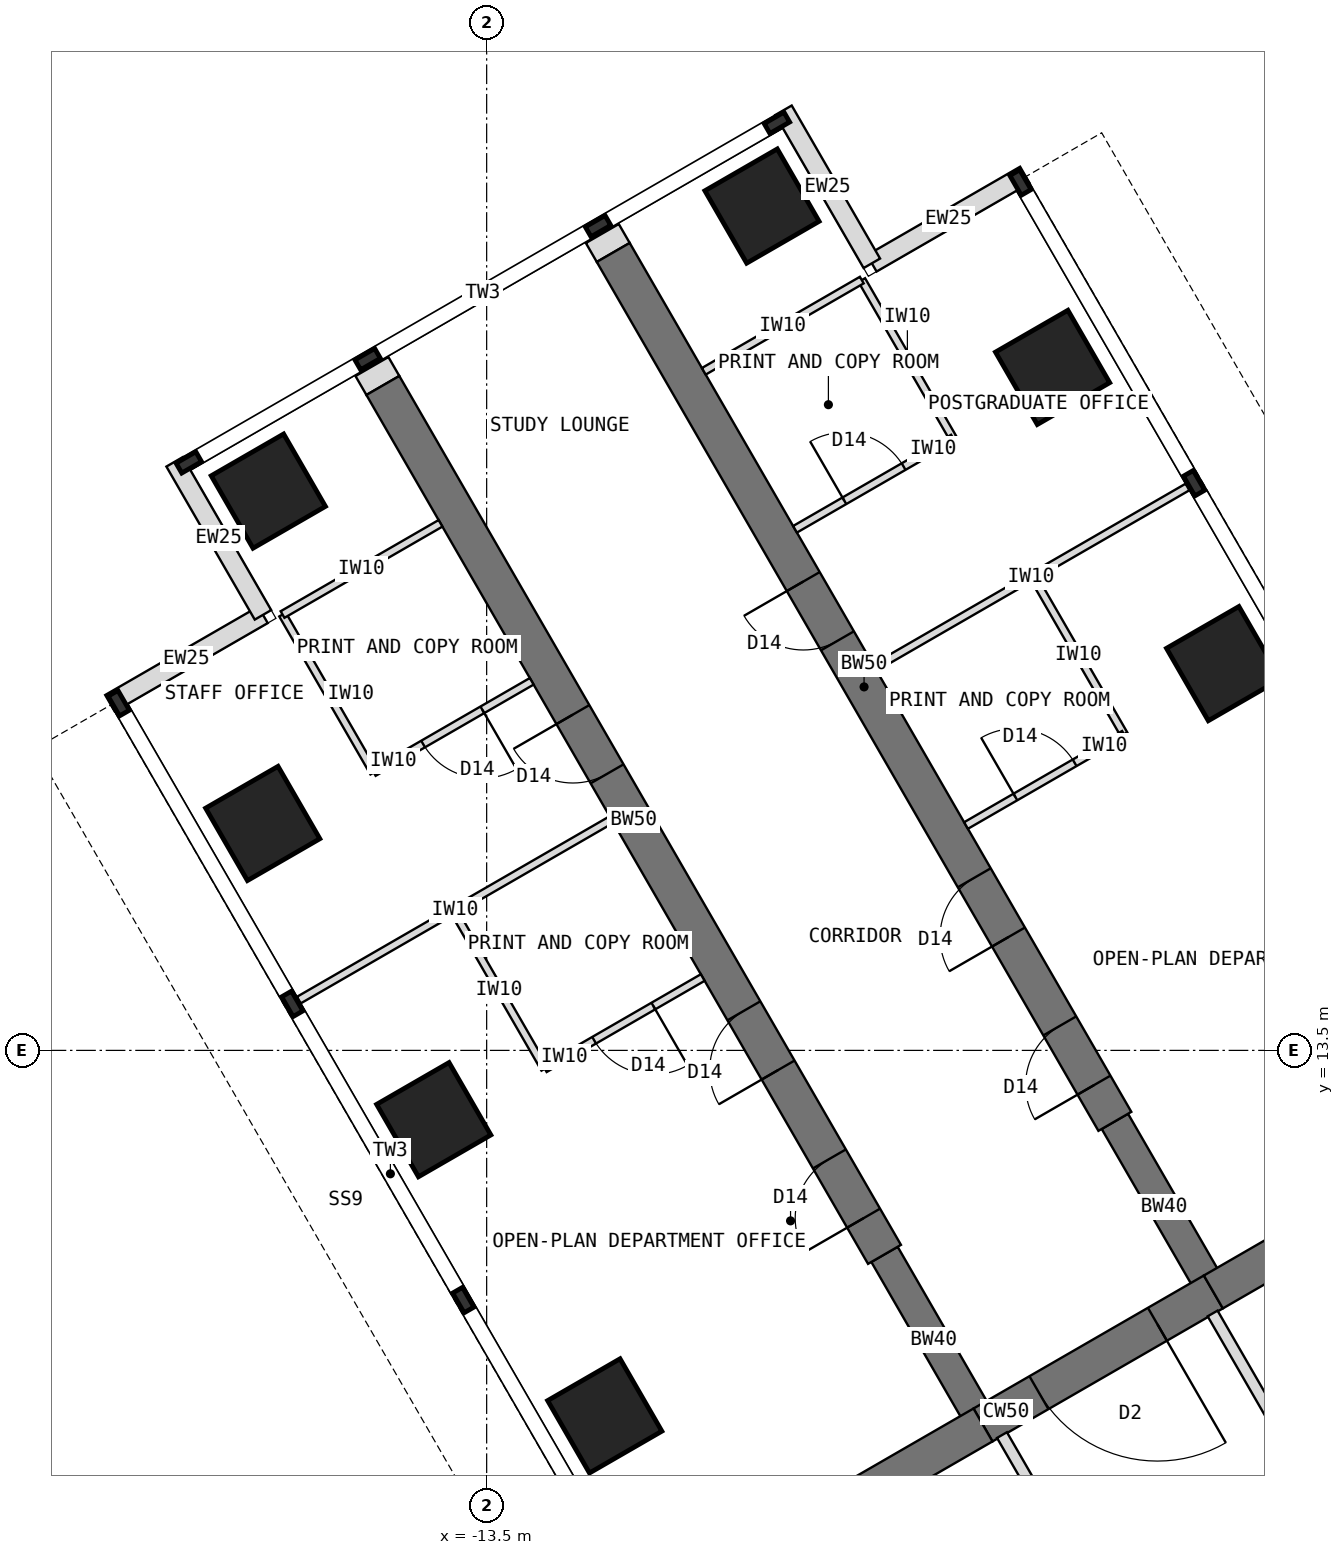
"""IFC4 building model, lengths in metres.
Left out: names, types, materials, properties, quantities, classifications, styles, units other than length and angle.
Written with IfcOpenShell. Run it as: python <this file> out.ifc"""

import sys

from ifc_helpers import new_model, si_unit, direction, frame, frame_2d, origin, origin_2d, place, context, subcontext, project, spatial, rectangle, extrude, element, fill, save


model = new_model("IFC4")
c1 = context("Model", 3, precision=1e-05, world=origin(), true_north=direction((0.0, 1.0)))
c2 = subcontext(c1, "Body", "Model", "MODEL_VIEW")
j1 = project(units=[si_unit("LENGTHUNIT", "METRE"), si_unit("PLANEANGLEUNIT", "RADIAN")], contexts=[c1])
p1 = place(None, origin())
s1 = spatial("IfcSite", under=j1, at=p1, CompositionType="ELEMENT")
p2 = place(p1, origin())
s2 = spatial("IfcBuilding", under=s1, at=p2, CompositionType="ELEMENT")
p3 = place(p2, frame((0.0, 0.0, 218.5)))
s3 = spatial("IfcBuildingStorey", under=s2, at=p3, CompositionType="ELEMENT", Elevation=218.5)
p4 = place(p3, frame((0.0, 12.596, 0.0), z_axis=(0.0, 0.0, 1.0), x_axis=(-0.866011268655, -0.500024481964, 0.0)))
e1 = element("IfcWall", 1, at=p4, inside=s3, PredefinedType="SHEAR", context=c2, shape_type="SweptSolid", body=[
    extrude(rectangle(XDim=4.548, YDim=0.5, at=frame_2d((2.274, 0.0))), origin(), (0.0, 0.0, 1.0), 4.0),
])
p5 = place(p3, frame((-3.939, 10.322, 0.0), z_axis=(0.0, 0.0, 1.0), x_axis=(-0.866019471182, -0.500010275428, 0.0)))
e2 = element("IfcWall", 2, at=p5, inside=s3, PredefinedType="SHEAR", context=c2, shape_type="SweptSolid", body=[
    extrude(rectangle(XDim=3.5, YDim=0.5, at=frame_2d((1.75, 0.0))), origin(), (0.0, 0.0, 1.0), 4.0),
])
p6 = place(p5, frame((0.85, 0.0, 0.0)))
e3 = element("IfcOpeningElement", 3, at=p6, cuts=e2, PredefinedType="OPENING", context=c2, shape_type="SweptSolid", body=[
    extrude(rectangle(XDim=1.8, YDim=2.1, at=frame_2d((0.9, 1.05))), frame((0.0, 0.26, 0.0), z_axis=(0.0, -1.0, 0.0), x_axis=(1.0, 0.0, 0.0)), (0.0, 0.0, 1.0), 0.52),
])
p7 = place(p3, frame((-6.97, 8.572, 0.0), z_axis=(0.0, 0.0, 1.0), x_axis=(-0.866034513004, -0.499984222037, 0.0)))
e4 = element("IfcWall", 4, at=p7, inside=s3, PredefinedType="SHEAR", context=c2, shape_type="SweptSolid", body=[
    extrude(rectangle(XDim=4.548, YDim=0.5, at=frame_2d((2.274, 0.0))), origin(), (0.0, 0.0, 1.0), 4.0),
])
p8 = place(p3, frame((-6.97, 8.572, 0.0), z_axis=(0.0, 0.0, 1.0), x_axis=(-0.499988811324, 0.866031863473, 0.0)))
e5 = element("IfcWall", 5, at=p8, inside=s3, PredefinedType="SHEAR", context=c2, shape_type="SweptSolid", body=[
    extrude(rectangle(XDim=2.592, YDim=0.4, at=frame_2d((1.296, 0.0))), origin(), (0.0, 0.0, 1.0), 4.0),
])
p9 = place(p3, frame((-8.266, 10.816, 0.0), z_axis=(0.0, 0.0, 1.0), x_axis=(-0.499996231654, 0.866027579429, 0.0)))
e6 = element("IfcWall", 6, at=p9, inside=s3, PredefinedType="SHEAR", context=c2, shape_type="SweptSolid", body=[
    extrude(rectangle(XDim=13.2, YDim=0.5, at=frame_2d((6.6, 0.0))), origin(), (0.0, 0.0, 1.0), 4.0),
])
p10 = place(p9, frame((0.55, 0.0, 0.0)))
e7 = element("IfcOpeningElement", 7, at=p10, cuts=e6, PredefinedType="OPENING", context=c2, shape_type="SweptSolid", body=[
    extrude(rectangle(XDim=0.9, YDim=2.1, at=frame_2d((0.45, 1.05))), frame((0.0, 0.26, 0.0), z_axis=(0.0, -1.0, 0.0), x_axis=(1.0, 0.0, 0.0)), (0.0, 0.0, 1.0), 0.52),
])
p11 = place(p9, frame((2.8, 0.0, 0.0)))
e8 = element("IfcOpeningElement", 8, at=p11, cuts=e6, PredefinedType="OPENING", context=c2, shape_type="SweptSolid", body=[
    extrude(rectangle(XDim=0.9, YDim=2.1, at=frame_2d((0.45, 1.05))), frame((0.0, 0.26, 0.0), z_axis=(0.0, -1.0, 0.0), x_axis=(1.0, 0.0, 0.0)), (0.0, 0.0, 1.0), 0.52),
])
p12 = place(p9, frame((7.3, 0.0, 0.0)))
e9 = element("IfcOpeningElement", 9, at=p12, cuts=e6, PredefinedType="OPENING", context=c2, shape_type="SweptSolid", body=[
    extrude(rectangle(XDim=0.9, YDim=2.1, at=frame_2d((0.45, 1.05))), frame((0.0, 0.26, 0.0), z_axis=(0.0, -1.0, 0.0), x_axis=(1.0, 0.0, 0.0)), (0.0, 0.0, 1.0), 0.52),
])
p13 = place(p3, frame((-3.939, 10.322, 0.0), z_axis=(0.0, 0.0, 1.0), x_axis=(-0.499918158782, 0.866072649678, 0.0)))
e10 = element("IfcWall", 10, at=p13, inside=s3, PredefinedType="SHEAR", context=c2, shape_type="SweptSolid", body=[
    extrude(rectangle(XDim=2.592, YDim=0.4, at=frame_2d((1.296, 0.0))), origin(), (0.0, 0.0, 1.0), 4.0),
])
p14 = place(p3, frame((-5.234, 12.566, 0.0), z_axis=(0.0, 0.0, 1.0), x_axis=(-0.500010103361, 0.866019570528, 0.0)))
e11 = element("IfcWall", 11, at=p14, inside=s3, PredefinedType="SHEAR", context=c2, shape_type="SweptSolid", body=[
    extrude(rectangle(XDim=13.2, YDim=0.5, at=frame_2d((6.6, 0.0))), origin(), (0.0, 0.0, 1.0), 4.0),
])
p15 = place(p14, frame((0.55, 0.0, 0.0)))
e12 = element("IfcOpeningElement", 12, at=p15, cuts=e11, PredefinedType="OPENING", context=c2, shape_type="SweptSolid", body=[
    extrude(rectangle(XDim=0.9, YDim=2.1, at=frame_2d((0.45, 1.05))), frame((0.0, 0.26, 0.0), z_axis=(0.0, -1.0, 0.0), x_axis=(1.0, 0.0, 0.0)), (0.0, 0.0, 1.0), 0.52),
])
p16 = place(p14, frame((2.8, 0.0, 0.0)))
e13 = element("IfcOpeningElement", 13, at=p16, cuts=e11, PredefinedType="OPENING", context=c2, shape_type="SweptSolid", body=[
    extrude(rectangle(XDim=0.9, YDim=2.1, at=frame_2d((0.45, 1.05))), frame((0.0, 0.26, 0.0), z_axis=(0.0, -1.0, 0.0), x_axis=(1.0, 0.0, 0.0)), (0.0, 0.0, 1.0), 0.52),
])
p17 = place(p14, frame((7.3, 0.0, 0.0)))
e14 = element("IfcOpeningElement", 14, at=p17, cuts=e11, PredefinedType="OPENING", context=c2, shape_type="SweptSolid", body=[
    extrude(rectangle(XDim=0.9, YDim=2.1, at=frame_2d((0.45, 1.05))), frame((0.0, 0.26, 0.0), z_axis=(0.0, -1.0, 0.0), x_axis=(1.0, 0.0, 0.0)), (0.0, 0.0, 1.0), 0.52),
])
for number, where, z_axis, x_axis in (
    (15, (-11.946, 8.691, 0.0), (0.0, 0.0, 1.0), (0.866, 0.5, 0.0)),
    (16, (-14.196, 12.588, 0.0), (0.0, 0.0, 1.0), (0.866, 0.5, 0.0)),
    (17, (-3.804, 18.588, 0.0), (0.0, 0.0, 1.0), (0.866, 0.5, 0.0)),
    (18, (-16.446, 16.486, 0.0), (0.0, 0.0, 1.0), (0.866, 0.5, 0.0)),
    (19, (-6.054, 22.486, 0.0), (0.0, 0.0, 1.0), (0.866, 0.5, 0.0)),
    (20, (-16.373, 20.858, 0.0), (0.0, 0.0, 1.0), (0.866, 0.5, 0.0)),
    (21, (-9.877, 24.608, 0.0), (0.0, 0.0, 1.0), (0.866, 0.5, 0.0)),
):
    element("IfcColumn", number, at=place(p3, frame(where, z_axis=z_axis, x_axis=x_axis)), inside=s3, PredefinedType="COLUMN", context=c2, shape_type="SweptSolid", body=[
        extrude(rectangle(XDim=1.1, YDim=1.1, at=origin_2d()), origin(), (0.0, 0.0, 1.0), 4.0),
    ])
for number, where, z_axis, x_axis in (
    (22, (-18.456, 18.067, 0.0), (0.0, 0.0, 1.0), (0.866, 0.5, 0.0)),
    (23, (-16.443, 19.23, 0.0), (0.0, 0.0, 1.0), (-0.5, 0.866, 0.0)),
    (24, (-6.419, 25.017, 0.0), (0.0, 0.0, 1.0), (-0.866, -0.5, 0.0)),
    (25, (-8.432, 23.855, 0.0), (0.0, 0.0, 1.0), (-0.5, 0.866, 0.0)),
):
    element("IfcWall", number, at=place(p3, frame(where, z_axis=z_axis, x_axis=x_axis)), inside=s3, PredefinedType="STANDARD", context=c2, shape_type="SweptSolid", body=[
        extrude(rectangle(XDim=2.325, YDim=0.25, at=frame_2d((1.163, 0.0))), origin(), (0.0, 0.0, 1.0), 3.8),
    ])
for number, where, z_axis, x_axis in (
    (26, (-14.865, 22.248, 0.0), (0.0, 0.0, 1.0), (-0.5, 0.866, 0.0)),
    (27, (-11.834, 23.998, 0.0), (0.0, 0.0, 1.0), (-0.5, 0.866, 0.0)),
):
    element("IfcWall", number, at=place(p3, frame(where, z_axis=z_axis, x_axis=x_axis)), inside=s3, PredefinedType="PARTITIONING", context=c2, shape_type="SweptSolid", body=[
        extrude(rectangle(XDim=0.288, YDim=0.5, at=frame_2d((0.144, 0.0))), origin(), (0.0, 0.0, 1.0), 3.8),
    ])
p18 = place(p3, frame((-11.857, 16.537, 0.0), z_axis=(0.0, 0.0, 1.0), x_axis=(-0.866033238375, -0.499986429846, 0.0)))
e28 = element("IfcWall", 28, at=p18, inside=s3, PredefinedType="PARTITIONING", context=c2, shape_type="SweptSolid", body=[
    extrude(rectangle(XDim=4.75, YDim=0.1, at=frame_2d((2.375, 0.0))), origin(), (0.0, 0.0, 1.0), 3.8),
])
p19 = place(p3, frame((-12.736, 13.259, 0.0), z_axis=(0.0, 0.0, 1.0), x_axis=(-0.500001309137, 0.866024647952, 0.0)))
e29 = element("IfcWall", 29, at=p19, inside=s3, PredefinedType="PARTITIONING", context=c2, shape_type="SweptSolid", body=[
    extrude(rectangle(XDim=2.4, YDim=0.1, at=frame_2d((1.2, 0.0))), origin(), (0.0, 0.0, 1.0), 3.8),
])
p20 = place(p3, frame((-10.657, 14.458, 0.0), z_axis=(0.0, 0.0, 1.0), x_axis=(-0.866050077142, -0.499957262057, 0.0)))
e30 = element("IfcWall", 30, at=p20, inside=s3, PredefinedType="PARTITIONING", context=c2, shape_type="SweptSolid", body=[
    extrude(rectangle(XDim=2.4, YDim=0.1, at=frame_2d((1.2, 0.0))), origin(), (0.0, 0.0, 1.0), 3.8),
])
p21 = place(p20, frame((0.75, 0.0, 0.0)))
e31 = element("IfcOpeningElement", 31, at=p21, cuts=e30, PredefinedType="OPENING", context=c2, shape_type="SweptSolid", body=[
    extrude(rectangle(XDim=0.9, YDim=2.1, at=frame_2d((0.45, 1.05))), frame((0.0, 0.06, 0.0), z_axis=(0.0, -1.0, 0.0), x_axis=(1.0, 0.0, 0.0)), (0.0, 0.0, 1.0), 0.12),
])
p22 = place(p3, frame((-14.986, 17.156, 0.0), z_axis=(0.0, 0.0, 1.0), x_axis=(-0.500001309137, 0.866024647952, 0.0)))
e32 = element("IfcWall", 32, at=p22, inside=s3, PredefinedType="PARTITIONING", context=c2, shape_type="SweptSolid", body=[
    extrude(rectangle(XDim=2.4, YDim=0.1, at=frame_2d((1.2, 0.0))), origin(), (0.0, 0.0, 1.0), 3.8),
])
p23 = place(p3, frame((-12.907, 18.356, 0.0), z_axis=(0.0, 0.0, 1.0), x_axis=(-0.866050077142, -0.499957262057, 0.0)))
e33 = element("IfcWall", 33, at=p23, inside=s3, PredefinedType="PARTITIONING", context=c2, shape_type="SweptSolid", body=[
    extrude(rectangle(XDim=2.4, YDim=0.1, at=frame_2d((1.2, 0.0))), origin(), (0.0, 0.0, 1.0), 3.8),
])
p24 = place(p23, frame((0.75, 0.0, 0.0)))
e34 = element("IfcOpeningElement", 34, at=p24, cuts=e33, PredefinedType="OPENING", context=c2, shape_type="SweptSolid", body=[
    extrude(rectangle(XDim=0.9, YDim=2.1, at=frame_2d((0.45, 1.05))), frame((0.0, 0.06, 0.0), z_axis=(0.0, -1.0, 0.0), x_axis=(1.0, 0.0, 0.0)), (0.0, 0.0, 1.0), 0.12),
])
p25 = place(p3, frame((-14.107, 20.434, 0.0), z_axis=(0.0, 0.0, 1.0), x_axis=(-0.866050077142, -0.499957262057, 0.0)))
e35 = element("IfcWall", 35, at=p25, inside=s3, PredefinedType="PARTITIONING", context=c2, shape_type="SweptSolid", body=[
    extrude(rectangle(XDim=2.4, YDim=0.1, at=frame_2d((1.2, 0.0))), origin(), (0.0, 0.0, 1.0), 3.8),
])
p26 = place(p3, frame((-8.393, 18.537, 0.0), z_axis=(0.0, 0.0, 1.0), x_axis=(0.866033238375, 0.499986429846, 0.0)))
e36 = element("IfcWall", 36, at=p26, inside=s3, PredefinedType="PARTITIONING", context=c2, shape_type="SweptSolid", body=[
    extrude(rectangle(XDim=4.75, YDim=0.1, at=frame_2d((2.375, 0.0))), origin(), (0.0, 0.0, 1.0), 3.8),
])
p27 = place(p3, frame((-5.115, 17.658, 0.0), z_axis=(0.0, 0.0, 1.0), x_axis=(-0.499957262057, 0.866050077142, 0.0)))
e37 = element("IfcWall", 37, at=p27, inside=s3, PredefinedType="PARTITIONING", context=c2, shape_type="SweptSolid", body=[
    extrude(rectangle(XDim=2.4, YDim=0.1, at=frame_2d((1.2, 0.0))), origin(), (0.0, 0.0, 1.0), 3.8),
])
p28 = place(p3, frame((-7.193, 16.458, 0.0), z_axis=(0.0, 0.0, 1.0), x_axis=(0.866024647952, 0.500001309137, 0.0)))
e38 = element("IfcWall", 38, at=p28, inside=s3, PredefinedType="PARTITIONING", context=c2, shape_type="SweptSolid", body=[
    extrude(rectangle(XDim=2.4, YDim=0.1, at=frame_2d((1.2, 0.0))), origin(), (0.0, 0.0, 1.0), 3.8),
])
p29 = place(p28, frame((0.75, 0.0, 0.0)))
e39 = element("IfcOpeningElement", 39, at=p29, cuts=e38, PredefinedType="OPENING", context=c2, shape_type="SweptSolid", body=[
    extrude(rectangle(XDim=0.9, YDim=2.1, at=frame_2d((0.45, 1.05))), frame((0.0, 0.06, 0.0), z_axis=(0.0, -1.0, 0.0), x_axis=(1.0, 0.0, 0.0)), (0.0, 0.0, 1.0), 0.12),
])
p30 = place(p3, frame((-7.365, 21.556, 0.0), z_axis=(0.0, 0.0, 1.0), x_axis=(-0.500001309137, 0.866024647952, 0.0)))
e40 = element("IfcWall", 40, at=p30, inside=s3, PredefinedType="PARTITIONING", context=c2, shape_type="SweptSolid", body=[
    extrude(rectangle(XDim=2.4, YDim=0.1, at=frame_2d((1.2, 0.0))), origin(), (0.0, 0.0, 1.0), 3.8),
])
p31 = place(p3, frame((-9.443, 20.356, 0.0), z_axis=(0.0, 0.0, 1.0), x_axis=(0.866024647952, 0.500001309137, 0.0)))
e41 = element("IfcWall", 41, at=p31, inside=s3, PredefinedType="PARTITIONING", context=c2, shape_type="SweptSolid", body=[
    extrude(rectangle(XDim=2.4, YDim=0.1, at=frame_2d((1.2, 0.0))), origin(), (0.0, 0.0, 1.0), 3.8),
])
p32 = place(p31, frame((0.75, 0.0, 0.0)))
e42 = element("IfcOpeningElement", 42, at=p32, cuts=e41, PredefinedType="OPENING", context=c2, shape_type="SweptSolid", body=[
    extrude(rectangle(XDim=0.9, YDim=2.1, at=frame_2d((0.45, 1.05))), frame((0.0, 0.06, 0.0), z_axis=(0.0, -1.0, 0.0), x_axis=(1.0, 0.0, 0.0)), (0.0, 0.0, 1.0), 0.12),
])
p33 = place(p3, frame((-10.643, 22.434, 0.0), z_axis=(0.0, 0.0, 1.0), x_axis=(0.866050077142, 0.499957262057, 0.0)))
e43 = element("IfcWall", 43, at=p33, inside=s3, PredefinedType="PARTITIONING", context=c2, shape_type="SweptSolid", body=[
    extrude(rectangle(XDim=2.4, YDim=0.1, at=frame_2d((1.2, 0.0))), origin(), (0.0, 0.0, 1.0), 3.8),
])
p34 = place(p3, frame((-4.436, 4.483, 0.0), z_axis=(0.0, 0.0, 1.0), x_axis=(-0.500001558674, 0.866024503882, 0.0)))
e44 = element("IfcWall", 44, at=p34, inside=s3, PredefinedType="PARTITIONING", context=c2, shape_type="SweptSolid", body=[
    extrude(rectangle(XDim=4.568, YDim=0.15, at=frame_2d((2.284, 0.0))), origin(), (0.0, 0.0, 1.0), 3.8),
])
p35 = place(p34, frame((1.794, 0.0, 0.0)))
e45 = element("IfcOpeningElement", 45, at=p35, cuts=e44, PredefinedType="OPENING", context=c2, shape_type="SweptSolid", body=[
    extrude(rectangle(XDim=1.0, YDim=2.1, at=frame_2d((0.5, 1.05))), frame((0.0, 0.085, 0.0), z_axis=(0.0, -1.0, 0.0), x_axis=(1.0, 0.0, 0.0)), (0.0, 0.0, 1.0), 0.17),
])
p36 = place(p3, frame((-3.948, 10.039, 0.0), z_axis=(0.0, 0.0, 1.0), x_axis=(0.500001558674, -0.866024503882, 0.0)))
e46 = element("IfcWall", 46, at=p36, inside=s3, PredefinedType="PARTITIONING", context=c2, shape_type="SweptSolid", body=[
    extrude(rectangle(XDim=4.568, YDim=0.15, at=frame_2d((2.284, 0.0))), origin(), (0.0, 0.0, 1.0), 3.8),
])
p37 = place(p36, frame((1.774, 0.0, 0.0)))
e47 = element("IfcOpeningElement", 47, at=p37, cuts=e46, PredefinedType="OPENING", context=c2, shape_type="SweptSolid", body=[
    extrude(rectangle(XDim=1.0, YDim=2.1, at=frame_2d((0.5, 1.05))), frame((0.0, 0.085, 0.0), z_axis=(0.0, -1.0, 0.0), x_axis=(1.0, 0.0, 0.0)), (0.0, 0.0, 1.0), 0.17),
])
p38 = place(p6, origin())
e48 = element("IfcDoor", 48, at=p38, inside=s3, OperationType="DOUBLE_DOOR_DOUBLE_SWING", PredefinedType="DOOR", context=c2, shape_type="SweptSolid", body=[
    extrude(rectangle(XDim=1.8, YDim=2.1, at=frame_2d((0.9, 1.05))), frame((0.0, 0.025, 0.0), z_axis=(0.0, -1.0, 0.0), x_axis=(1.0, 0.0, 0.0)), (0.0, 0.0, 1.0), 0.05),
])
fill(e3, e48)
p39 = place(p21, origin())
e49 = element("IfcDoor", 49, at=p39, inside=s3, OperationType="SINGLE_SWING_LEFT", PredefinedType="DOOR", context=c2, shape_type="SweptSolid", body=[
    extrude(rectangle(XDim=0.9, YDim=2.1, at=frame_2d((0.45, 1.05))), frame((0.0, 0.025, 0.0), z_axis=(0.0, -1.0, 0.0), x_axis=(1.0, 0.0, 0.0)), (0.0, 0.0, 1.0), 0.05),
])
fill(e31, e49)
p40 = place(p24, origin())
e50 = element("IfcDoor", 50, at=p40, inside=s3, OperationType="SINGLE_SWING_LEFT", PredefinedType="DOOR", context=c2, shape_type="SweptSolid", body=[
    extrude(rectangle(XDim=0.9, YDim=2.1, at=frame_2d((0.45, 1.05))), frame((0.0, 0.025, 0.0), z_axis=(0.0, -1.0, 0.0), x_axis=(1.0, 0.0, 0.0)), (0.0, 0.0, 1.0), 0.05),
])
fill(e34, e50)
p41 = place(p29, origin())
e51 = element("IfcDoor", 51, at=p41, inside=s3, OperationType="SINGLE_SWING_LEFT", PredefinedType="DOOR", context=c2, shape_type="SweptSolid", body=[
    extrude(rectangle(XDim=0.9, YDim=2.1, at=frame_2d((0.45, 1.05))), frame((0.0, 0.025, 0.0), z_axis=(0.0, -1.0, 0.0), x_axis=(1.0, 0.0, 0.0)), (0.0, 0.0, 1.0), 0.05),
])
fill(e39, e51)
p42 = place(p32, origin())
e52 = element("IfcDoor", 52, at=p42, inside=s3, OperationType="SINGLE_SWING_LEFT", PredefinedType="DOOR", context=c2, shape_type="SweptSolid", body=[
    extrude(rectangle(XDim=0.9, YDim=2.1, at=frame_2d((0.45, 1.05))), frame((0.0, 0.025, 0.0), z_axis=(0.0, -1.0, 0.0), x_axis=(1.0, 0.0, 0.0)), (0.0, 0.0, 1.0), 0.05),
])
fill(e42, e52)
p43 = place(p10, origin())
e53 = element("IfcDoor", 53, at=p43, inside=s3, OperationType="SINGLE_SWING_LEFT", PredefinedType="DOOR", context=c2, shape_type="SweptSolid", body=[
    extrude(rectangle(XDim=0.9, YDim=2.1, at=frame_2d((0.45, 1.05))), frame((0.0, 0.025, 0.0), z_axis=(0.0, -1.0, 0.0), x_axis=(1.0, 0.0, 0.0)), (0.0, 0.0, 1.0), 0.05),
])
fill(e7, e53)
p44 = place(p11, origin())
e54 = element("IfcDoor", 54, at=p44, inside=s3, OperationType="SINGLE_SWING_LEFT", PredefinedType="DOOR", context=c2, shape_type="SweptSolid", body=[
    extrude(rectangle(XDim=0.9, YDim=2.1, at=frame_2d((0.45, 1.05))), frame((0.0, 0.025, 0.0), z_axis=(0.0, -1.0, 0.0), x_axis=(1.0, 0.0, 0.0)), (0.0, 0.0, 1.0), 0.05),
])
fill(e8, e54)
p45 = place(p12, origin())
e55 = element("IfcDoor", 55, at=p45, inside=s3, OperationType="SINGLE_SWING_RIGHT", PredefinedType="DOOR", context=c2, shape_type="SweptSolid", body=[
    extrude(rectangle(XDim=0.9, YDim=2.1, at=frame_2d((0.45, 1.05))), frame((0.0, 0.025, 0.0), z_axis=(0.0, -1.0, 0.0), x_axis=(1.0, 0.0, 0.0)), (0.0, 0.0, 1.0), 0.05),
])
fill(e9, e55)
p46 = place(p15, origin())
e56 = element("IfcDoor", 56, at=p46, inside=s3, OperationType="SINGLE_SWING_LEFT", PredefinedType="DOOR", context=c2, shape_type="SweptSolid", body=[
    extrude(rectangle(XDim=0.9, YDim=2.1, at=frame_2d((0.45, 1.05))), frame((0.0, 0.025, 0.0), z_axis=(0.0, -1.0, 0.0), x_axis=(1.0, 0.0, 0.0)), (0.0, 0.0, 1.0), 0.05),
])
fill(e12, e56)
p47 = place(p16, origin())
e57 = element("IfcDoor", 57, at=p47, inside=s3, OperationType="SINGLE_SWING_LEFT", PredefinedType="DOOR", context=c2, shape_type="SweptSolid", body=[
    extrude(rectangle(XDim=0.9, YDim=2.1, at=frame_2d((0.45, 1.05))), frame((0.0, 0.025, 0.0), z_axis=(0.0, -1.0, 0.0), x_axis=(1.0, 0.0, 0.0)), (0.0, 0.0, 1.0), 0.05),
])
fill(e13, e57)
p48 = place(p17, origin())
e58 = element("IfcDoor", 58, at=p48, inside=s3, OperationType="SINGLE_SWING_RIGHT", PredefinedType="DOOR", context=c2, shape_type="SweptSolid", body=[
    extrude(rectangle(XDim=0.9, YDim=2.1, at=frame_2d((0.45, 1.05))), frame((0.0, 0.025, 0.0), z_axis=(0.0, -1.0, 0.0), x_axis=(1.0, 0.0, 0.0)), (0.0, 0.0, 1.0), 0.05),
])
fill(e14, e58)
save(model, sys.argv[1])
